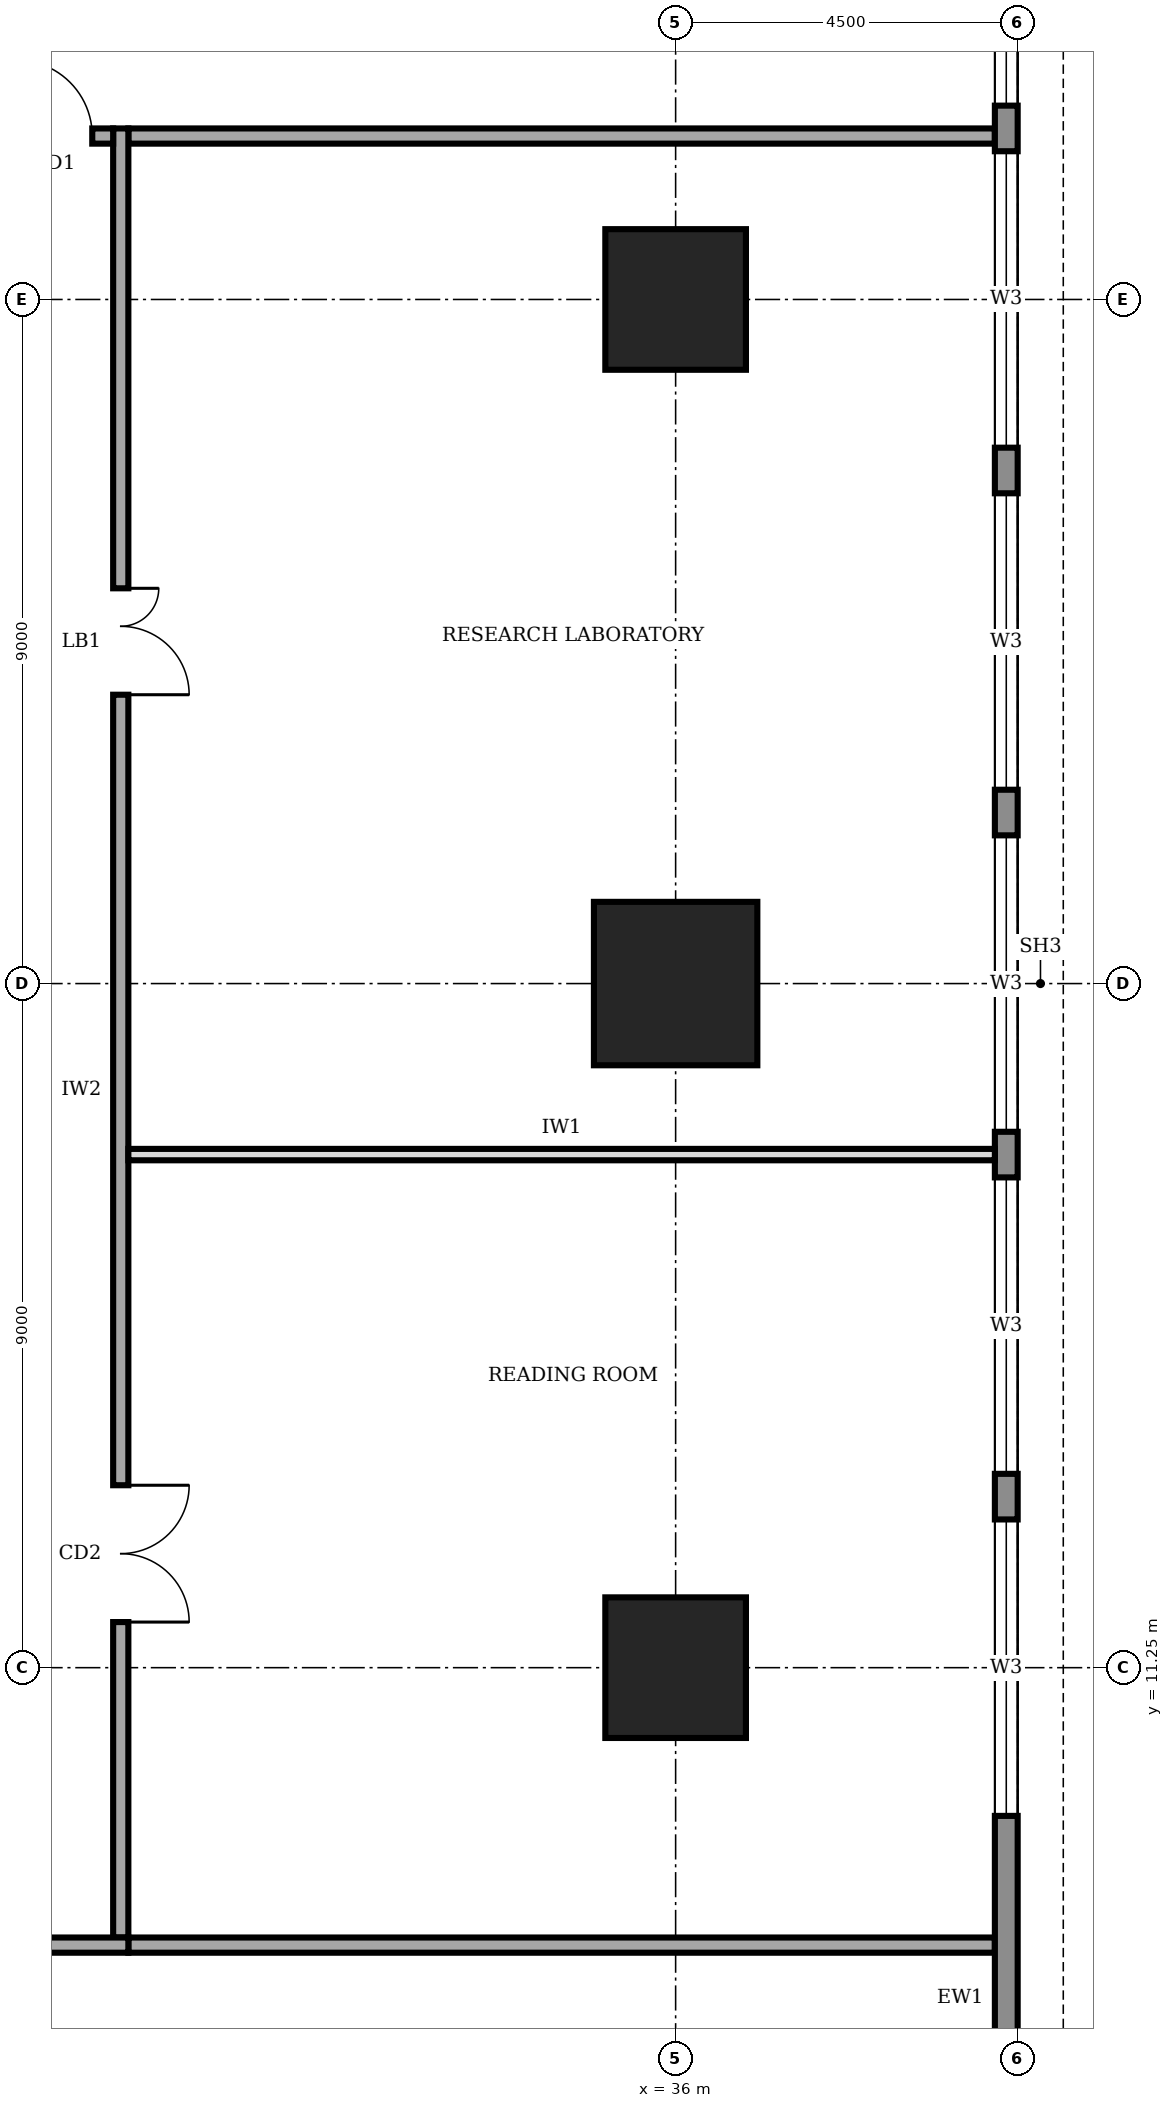
"""IFC4 building model, lengths in metres.
Left out: names, types, materials, properties, quantities, classifications, styles, units other than length and angle.
Written with IfcOpenShell. Run it as: python <this file> out.ifc"""

import sys

from ifc_helpers import new_model, si_unit, direction, frame, frame_2d, origin, origin_2d, place, context, subcontext, project, spatial, rectangle, extrude, element, fill, save


model = new_model("IFC4")
c1 = context("Model", 3, precision=1e-05, world=origin(), true_north=direction((0.0, 1.0)))
c2 = subcontext(c1, "Body", "Model", "MODEL_VIEW")
j1 = project(units=[si_unit("LENGTHUNIT", "METRE"), si_unit("PLANEANGLEUNIT", "RADIAN")], contexts=[c1])
p1 = place(None, origin())
s1 = spatial("IfcSite", under=j1, at=p1, CompositionType="ELEMENT")
p2 = place(p1, origin())
s2 = spatial("IfcBuilding", under=s1, at=p2, CompositionType="ELEMENT")
p3 = place(p2, frame((0.0, 0.0, 265.0)))
s3 = spatial("IfcBuildingStorey", under=s2, at=p3, CompositionType="ELEMENT", Elevation=265.0)
p4 = place(p3, frame((36.0, 11.25, 0.0), z_axis=(0.0, 0.0, 1.0), x_axis=(1.0, 0.0, 0.0)))
e1 = element("IfcColumn", 1, at=p4, inside=s3, PredefinedType="COLUMN", context=c2, shape_type="SweptSolid", body=[
    extrude(rectangle(XDim=1.85, YDim=1.85, at=origin_2d()), origin(), (0.0, 0.0, 1.0), 4.0),
])
p5 = place(p3, frame((36.0, 20.25, 0.0), z_axis=(0.0, 0.0, 1.0), x_axis=(1.0, 0.0, 0.0)))
e2 = element("IfcColumn", 2, at=p5, inside=s3, PredefinedType="COLUMN", context=c2, shape_type="SweptSolid", body=[
    extrude(rectangle(XDim=2.15, YDim=2.15, at=origin_2d()), origin(), (0.0, 0.0, 1.0), 4.0),
])
p6 = place(p3, frame((36.0, 29.25, 0.0), z_axis=(0.0, 0.0, 1.0), x_axis=(1.0, 0.0, 0.0)))
e3 = element("IfcColumn", 3, at=p6, inside=s3, PredefinedType="COLUMN", context=c2, shape_type="SweptSolid", body=[
    extrude(rectangle(XDim=1.85, YDim=1.85, at=origin_2d()), origin(), (0.0, 0.0, 1.0), 4.0),
])
p7 = place(p3, frame((40.35, 4.52, 0.0), z_axis=(0.0, 0.0, 1.0), x_axis=(0.0, 1.0, 0.0)))
e4 = element("IfcWall", 4, at=p7, inside=s3, PredefinedType="STANDARD", context=c2, shape_type="SweptSolid", body=[
    extrude(rectangle(XDim=31.46, YDim=0.3, at=frame_2d((15.73, 0.0))), origin(), (0.0, 0.0, 1.0), 3.75),
])
p8 = place(p7, frame((4.78, 0.0, 0.95)))
e5 = element("IfcOpeningElement", 5, at=p8, cuts=e4, PredefinedType="OPENING", context=c2, shape_type="SweptSolid", body=[
    extrude(rectangle(XDim=3.9, YDim=1.8, at=frame_2d((1.95, 0.9))), frame((0.0, 0.16, 0.0), z_axis=(0.0, -1.0, 0.0), x_axis=(1.0, 0.0, 0.0)), (0.0, 0.0, 1.0), 0.32),
])
p9 = place(p7, frame((9.28, 0.0, 0.95)))
e6 = element("IfcOpeningElement", 6, at=p9, cuts=e4, PredefinedType="OPENING", context=c2, shape_type="SweptSolid", body=[
    extrude(rectangle(XDim=3.9, YDim=1.8, at=frame_2d((1.95, 0.9))), frame((0.0, 0.16, 0.0), z_axis=(0.0, -1.0, 0.0), x_axis=(1.0, 0.0, 0.0)), (0.0, 0.0, 1.0), 0.32),
])
p10 = place(p7, frame((13.78, 0.0, 0.95)))
e7 = element("IfcOpeningElement", 7, at=p10, cuts=e4, PredefinedType="OPENING", context=c2, shape_type="SweptSolid", body=[
    extrude(rectangle(XDim=3.9, YDim=1.8, at=frame_2d((1.95, 0.9))), frame((0.0, 0.16, 0.0), z_axis=(0.0, -1.0, 0.0), x_axis=(1.0, 0.0, 0.0)), (0.0, 0.0, 1.0), 0.32),
])
p11 = place(p7, frame((18.28, 0.0, 0.95)))
e8 = element("IfcOpeningElement", 8, at=p11, cuts=e4, PredefinedType="OPENING", context=c2, shape_type="SweptSolid", body=[
    extrude(rectangle(XDim=3.9, YDim=1.8, at=frame_2d((1.95, 0.9))), frame((0.0, 0.16, 0.0), z_axis=(0.0, -1.0, 0.0), x_axis=(1.0, 0.0, 0.0)), (0.0, 0.0, 1.0), 0.32),
])
p12 = place(p7, frame((22.78, 0.0, 0.95)))
e9 = element("IfcOpeningElement", 9, at=p12, cuts=e4, PredefinedType="OPENING", context=c2, shape_type="SweptSolid", body=[
    extrude(rectangle(XDim=3.9, YDim=1.8, at=frame_2d((1.95, 0.9))), frame((0.0, 0.16, 0.0), z_axis=(0.0, -1.0, 0.0), x_axis=(1.0, 0.0, 0.0)), (0.0, 0.0, 1.0), 0.32),
])
p13 = place(p7, frame((27.28, 0.0, 0.95)))
e10 = element("IfcOpeningElement", 10, at=p13, cuts=e4, PredefinedType="OPENING", context=c2, shape_type="SweptSolid", body=[
    extrude(rectangle(XDim=3.9, YDim=1.8, at=frame_2d((1.95, 0.9))), frame((0.0, 0.16, 0.0), z_axis=(0.0, -1.0, 0.0), x_axis=(1.0, 0.0, 0.0)), (0.0, 0.0, 1.0), 0.32),
])
p14 = place(p3, frame((11.9, 7.6, 0.0), z_axis=(0.0, 0.0, 1.0), x_axis=(1.0, 0.0, 0.0)))
e11 = element("IfcWall", 11, at=p14, inside=s3, PredefinedType="SOLIDWALL", context=c2, shape_type="SweptSolid", body=[
    extrude(rectangle(XDim=16.9, YDim=0.2, at=frame_2d((8.45, 0.0))), origin(), (0.0, 0.0, 1.0), 3.75),
])
p15 = place(p14, frame((4.5, 0.0, 0.0)))
e12 = element("IfcOpeningElement", 12, at=p15, cuts=e11, PredefinedType="OPENING", context=c2, shape_type="SweptSolid", body=[
    extrude(rectangle(XDim=1.4, YDim=2.1, at=frame_2d((0.7, 1.05))), frame((0.0, 0.11, 0.0), z_axis=(0.0, -1.0, 0.0), x_axis=(1.0, 0.0, 0.0)), (0.0, 0.0, 1.0), 0.22),
])
p16 = place(p14, frame((12.85, 0.0, 0.0)))
e13 = element("IfcOpeningElement", 13, at=p16, cuts=e11, PredefinedType="OPENING", context=c2, shape_type="SweptSolid", body=[
    extrude(rectangle(XDim=1.8, YDim=2.1, at=frame_2d((0.9, 1.05))), frame((0.0, 0.11, 0.0), z_axis=(0.0, -1.0, 0.0), x_axis=(1.0, 0.0, 0.0)), (0.0, 0.0, 1.0), 0.22),
])
p17 = place(p3, frame((28.7, 7.7, 0.0), z_axis=(0.0, 0.0, 1.0), x_axis=(0.0, 1.0, 0.0)))
e14 = element("IfcWall", 14, at=p17, inside=s3, PredefinedType="SOLIDWALL", context=c2, shape_type="SweptSolid", body=[
    extrude(rectangle(XDim=23.8, YDim=0.2, at=frame_2d((11.9, 0.0))), origin(), (0.0, 0.0, 1.0), 3.75),
])
p18 = place(p17, frame((4.15, 0.0, 0.0)))
e15 = element("IfcOpeningElement", 15, at=p18, cuts=e14, PredefinedType="OPENING", context=c2, shape_type="SweptSolid", body=[
    extrude(rectangle(XDim=1.8, YDim=2.1, at=frame_2d((0.9, 1.05))), frame((0.0, 0.11, 0.0), z_axis=(0.0, -1.0, 0.0), x_axis=(1.0, 0.0, 0.0)), (0.0, 0.0, 1.0), 0.22),
])
p19 = place(p17, frame((16.35, 0.0, 0.0)))
e16 = element("IfcOpeningElement", 16, at=p19, cuts=e14, PredefinedType="OPENING", context=c2, shape_type="SweptSolid", body=[
    extrude(rectangle(XDim=1.4, YDim=2.1, at=frame_2d((0.7, 1.05))), frame((0.0, 0.11, 0.0), z_axis=(0.0, -1.0, 0.0), x_axis=(1.0, 0.0, 0.0)), (0.0, 0.0, 1.0), 0.22),
])
p20 = place(p3, frame((28.6, 31.4, 0.0), z_axis=(0.0, 0.0, 1.0), x_axis=(-1.0, 0.0, 0.0)))
e17 = element("IfcWall", 17, at=p20, inside=s3, PredefinedType="SOLIDWALL", context=c2, shape_type="SweptSolid", body=[
    extrude(rectangle(XDim=16.9, YDim=0.2, at=frame_2d((8.45, 0.0))), origin(), (0.0, 0.0, 1.0), 3.75),
])
p21 = place(p20, frame((13.05, 0.0, 0.0)))
e18 = element("IfcOpeningElement", 18, at=p21, cuts=e17, PredefinedType="OPENING", context=c2, shape_type="SweptSolid", body=[
    extrude(rectangle(XDim=1.4, YDim=2.1, at=frame_2d((0.7, 1.05))), frame((0.0, 0.11, 0.0), z_axis=(0.0, -1.0, 0.0), x_axis=(1.0, 0.0, 0.0)), (0.0, 0.0, 1.0), 0.22),
])
p22 = place(p20, frame((5.6, 0.0, 0.0)))
e19 = element("IfcOpeningElement", 19, at=p22, cuts=e17, PredefinedType="OPENING", context=c2, shape_type="SweptSolid", body=[
    extrude(rectangle(XDim=1.0, YDim=2.1, at=frame_2d((0.5, 1.05))), frame((0.0, 0.11, 0.0), z_axis=(0.0, -1.0, 0.0), x_axis=(1.0, 0.0, 0.0)), (0.0, 0.0, 1.0), 0.22),
])
p23 = place(p20, frame((0.275, 0.0, 0.0)))
e20 = element("IfcOpeningElement", 20, at=p23, cuts=e17, PredefinedType="OPENING", context=c2, shape_type="SweptSolid", body=[
    extrude(rectangle(XDim=1.0, YDim=2.1, at=frame_2d((0.5, 1.05))), frame((0.0, 0.11, 0.0), z_axis=(0.0, -1.0, 0.0), x_axis=(1.0, 0.0, 0.0)), (0.0, 0.0, 1.0), 0.22),
])
for number, where, z_axis, x_axis in (
    (21, (28.8, 7.6, 0.0), (0.0, 0.0, 1.0), (1.0, 0.0, 0.0)),
    (22, (28.8, 31.4, 0.0), (0.0, 0.0, 1.0), (1.0, 0.0, 0.0)),
):
    element("IfcWall", number, at=place(p3, frame(where, z_axis=z_axis, x_axis=x_axis)), inside=s3, PredefinedType="SOLIDWALL", context=c2, shape_type="SweptSolid", body=[
        extrude(rectangle(XDim=11.4, YDim=0.2, at=frame_2d((5.7, 0.0))), origin(), (0.0, 0.0, 1.0), 3.75),
    ])
p24 = place(p3, frame((28.8, 18.0, 0.0), z_axis=(0.0, 0.0, 1.0), x_axis=(1.0, 0.0, 0.0)))
e23 = element("IfcWall", 23, at=p24, inside=s3, PredefinedType="PARTITIONING", context=c2, shape_type="SweptSolid", body=[
    extrude(rectangle(XDim=11.4, YDim=0.15, at=frame_2d((5.7, 0.0))), origin(), (0.0, 0.0, 1.0), 3.75),
])
p25 = place(p8, origin())
e24 = element("IfcWindow", 24, at=p25, inside=s3, PartitioningType="SINGLE_PANEL", PredefinedType="WINDOW", context=c2, shape_type="SweptSolid", body=[
    extrude(rectangle(XDim=3.9, YDim=1.8, at=frame_2d((1.95, 0.9))), frame((0.0, 0.03, 0.0), z_axis=(0.0, -1.0, 0.0), x_axis=(1.0, 0.0, 0.0)), (0.0, 0.0, 1.0), 0.06),
])
fill(e5, e24)
p26 = place(p9, origin())
e25 = element("IfcWindow", 25, at=p26, inside=s3, PartitioningType="SINGLE_PANEL", PredefinedType="WINDOW", context=c2, shape_type="SweptSolid", body=[
    extrude(rectangle(XDim=3.9, YDim=1.8, at=frame_2d((1.95, 0.9))), frame((0.0, 0.03, 0.0), z_axis=(0.0, -1.0, 0.0), x_axis=(1.0, 0.0, 0.0)), (0.0, 0.0, 1.0), 0.06),
])
fill(e6, e25)
p27 = place(p10, origin())
e26 = element("IfcWindow", 26, at=p27, inside=s3, PartitioningType="SINGLE_PANEL", PredefinedType="WINDOW", context=c2, shape_type="SweptSolid", body=[
    extrude(rectangle(XDim=3.9, YDim=1.8, at=frame_2d((1.95, 0.9))), frame((0.0, 0.03, 0.0), z_axis=(0.0, -1.0, 0.0), x_axis=(1.0, 0.0, 0.0)), (0.0, 0.0, 1.0), 0.06),
])
fill(e7, e26)
p28 = place(p11, origin())
e27 = element("IfcWindow", 27, at=p28, inside=s3, PartitioningType="SINGLE_PANEL", PredefinedType="WINDOW", context=c2, shape_type="SweptSolid", body=[
    extrude(rectangle(XDim=3.9, YDim=1.8, at=frame_2d((1.95, 0.9))), frame((0.0, 0.03, 0.0), z_axis=(0.0, -1.0, 0.0), x_axis=(1.0, 0.0, 0.0)), (0.0, 0.0, 1.0), 0.06),
])
fill(e8, e27)
p29 = place(p12, origin())
e28 = element("IfcWindow", 28, at=p29, inside=s3, PartitioningType="SINGLE_PANEL", PredefinedType="WINDOW", context=c2, shape_type="SweptSolid", body=[
    extrude(rectangle(XDim=3.9, YDim=1.8, at=frame_2d((1.95, 0.9))), frame((0.0, 0.03, 0.0), z_axis=(0.0, -1.0, 0.0), x_axis=(1.0, 0.0, 0.0)), (0.0, 0.0, 1.0), 0.06),
])
fill(e9, e28)
p30 = place(p13, origin())
e29 = element("IfcWindow", 29, at=p30, inside=s3, PartitioningType="SINGLE_PANEL", PredefinedType="WINDOW", context=c2, shape_type="SweptSolid", body=[
    extrude(rectangle(XDim=3.9, YDim=1.8, at=frame_2d((1.95, 0.9))), frame((0.0, 0.03, 0.0), z_axis=(0.0, -1.0, 0.0), x_axis=(1.0, 0.0, 0.0)), (0.0, 0.0, 1.0), 0.06),
])
fill(e10, e29)
p31 = place(p18, frame((1.8, 0.0, 0.0), z_axis=(0.0, 0.0, 1.0), x_axis=(-1.0, 0.0, 0.0)))
e30 = element("IfcDoor", 30, at=p31, inside=s3, OperationType="DOUBLE_DOOR_SINGLE_SWING", PredefinedType="DOOR", context=c2, shape_type="SweptSolid", body=[
    extrude(rectangle(XDim=1.8, YDim=2.1, at=frame_2d((0.9, 1.05))), frame((0.0, 0.025, 0.0), z_axis=(0.0, -1.0, 0.0), x_axis=(1.0, 0.0, 0.0)), (0.0, 0.0, 1.0), 0.05),
])
fill(e15, e30)
p32 = place(p19, frame((1.4, 0.0, 0.0), z_axis=(0.0, 0.0, 1.0), x_axis=(-1.0, 0.0, 0.0)))
e31 = element("IfcDoor", 31, at=p32, inside=s3, OperationType="DOUBLE_DOOR_SINGLE_SWING", PredefinedType="DOOR", context=c2, shape_type="SweptSolid", body=[
    extrude(rectangle(XDim=1.4, YDim=2.1, at=frame_2d((0.7, 1.05))), frame((0.0, 0.025, 0.0), z_axis=(0.0, -1.0, 0.0), x_axis=(1.0, 0.0, 0.0)), (0.0, 0.0, 1.0), 0.05),
])
fill(e16, e31)
p33 = place(p23, frame((1.0, 0.0, 0.0), z_axis=(0.0, 0.0, 1.0), x_axis=(-1.0, 0.0, 0.0)))
e32 = element("IfcDoor", 32, at=p33, inside=s3, OperationType="SINGLE_SWING_LEFT", PredefinedType="DOOR", context=c2, shape_type="SweptSolid", body=[
    extrude(rectangle(XDim=1.0, YDim=2.1, at=frame_2d((0.5, 1.05))), frame((0.0, 0.025, 0.0), z_axis=(0.0, -1.0, 0.0), x_axis=(1.0, 0.0, 0.0)), (0.0, 0.0, 1.0), 0.05),
])
fill(e20, e32)
save(model, sys.argv[1])
